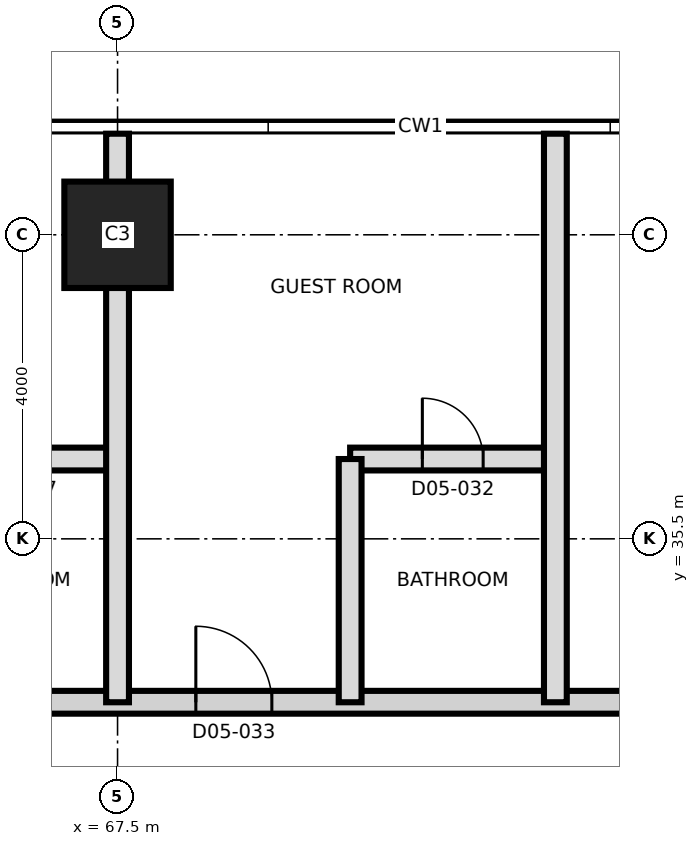
"""IFC4 building model, lengths in metres.
Left out: names, types, materials, properties, quantities, classifications, styles, units other than length and angle.
Written with IfcOpenShell. Run it as: python <this file> out.ifc"""

import sys

from ifc_helpers import new_model, si_unit, direction, frame, frame_2d, origin, origin_2d, place, context, subcontext, project, spatial, rectangle, extrude, element, fill, save


model = new_model("IFC4")
c1 = context("Model", 3, precision=1e-05, world=origin(), true_north=direction((0.0, 1.0)))
c2 = subcontext(c1, "Body", "Model", "MODEL_VIEW")
j1 = project(units=[si_unit("LENGTHUNIT", "METRE"), si_unit("PLANEANGLEUNIT", "RADIAN")], contexts=[c1])
p1 = place(None, origin())
s1 = spatial("IfcSite", under=j1, at=p1, CompositionType="ELEMENT")
p2 = place(p1, origin())
s2 = spatial("IfcBuilding", under=s1, at=p2, CompositionType="ELEMENT")
p3 = place(p2, frame((0.0, 0.0, 77.9)))
s3 = spatial("IfcBuildingStorey", under=s2, at=p3, CompositionType="ELEMENT", Elevation=77.9)
p4 = place(p3, frame((67.5, 39.5, 0.0), z_axis=(0.0, 0.0, 1.0), x_axis=(1.0, 0.0, 0.0)))
e1 = element("IfcColumn", 1, at=p4, inside=s3, PredefinedType="COLUMN", context=c2, shape_type="SweptSolid", body=[
    extrude(rectangle(XDim=1.4, YDim=1.4, at=origin_2d()), origin(), (0.0, 0.0, 1.0), 3.7),
])
p5 = place(p3, frame((58.95, 33.35, 0.0), z_axis=(0.0, 0.0, 1.0), x_axis=(1.0, 0.0, 0.0)))
e2 = element("IfcWall", 2, at=p5, inside=s3, PredefinedType="PARTITIONING", context=c2, shape_type="SweptSolid", body=[
    extrude(rectangle(XDim=26.38, YDim=0.3, at=frame_2d((13.19, 0.0))), origin(), (0.0, 0.0, 1.0), 3.4),
])
p6 = place(p5, frame((0.685, 0.0, 0.0)))
e3 = element("IfcOpeningElement", 3, at=p6, cuts=e2, PredefinedType="OPENING", context=c2, shape_type="SweptSolid", body=[
    extrude(rectangle(XDim=1.2, YDim=2.1, at=frame_2d((0.6, 1.05))), frame((0.0, 0.16, 0.0), z_axis=(0.0, -1.0, 0.0), x_axis=(1.0, 0.0, 0.0)), (0.0, 0.0, 1.0), 0.32),
])
p7 = place(p5, frame((3.935, 0.0, 0.0)))
e4 = element("IfcOpeningElement", 4, at=p7, cuts=e2, PredefinedType="OPENING", context=c2, shape_type="SweptSolid", body=[
    extrude(rectangle(XDim=1.0, YDim=2.1, at=frame_2d((0.5, 1.05))), frame((0.0, 0.16, 0.0), z_axis=(0.0, -1.0, 0.0), x_axis=(1.0, 0.0, 0.0)), (0.0, 0.0, 1.0), 0.32),
])
p8 = place(p5, frame((9.58, 0.0, 0.0)))
e5 = element("IfcOpeningElement", 5, at=p8, cuts=e2, PredefinedType="OPENING", context=c2, shape_type="SweptSolid", body=[
    extrude(rectangle(XDim=1.0, YDim=2.1, at=frame_2d((0.5, 1.05))), frame((0.0, 0.16, 0.0), z_axis=(0.0, -1.0, 0.0), x_axis=(1.0, 0.0, 0.0)), (0.0, 0.0, 1.0), 0.32),
])
p9 = place(p5, frame((15.43, 0.0, 0.0)))
e6 = element("IfcOpeningElement", 6, at=p9, cuts=e2, PredefinedType="OPENING", context=c2, shape_type="SweptSolid", body=[
    extrude(rectangle(XDim=1.0, YDim=2.1, at=frame_2d((0.5, 1.05))), frame((0.0, 0.16, 0.0), z_axis=(0.0, -1.0, 0.0), x_axis=(1.0, 0.0, 0.0)), (0.0, 0.0, 1.0), 0.32),
])
p10 = place(p5, frame((21.55, 0.0, 0.0)))
e7 = element("IfcOpeningElement", 7, at=p10, cuts=e2, PredefinedType="OPENING", context=c2, shape_type="SweptSolid", body=[
    extrude(rectangle(XDim=1.0, YDim=2.4, at=frame_2d((0.5, 1.2))), frame((0.0, 0.16, 0.0), z_axis=(0.0, -1.0, 0.0), x_axis=(1.0, 0.0, 0.0)), (0.0, 0.0, 1.0), 0.32),
])
p11 = place(p3, frame((64.8, 36.55, 0.0), z_axis=(0.0, 0.0, 1.0), x_axis=(1.0, 0.0, 0.0)))
e8 = element("IfcWall", 8, at=p11, inside=s3, PredefinedType="PARTITIONING", context=c2, shape_type="SweptSolid", body=[
    extrude(rectangle(XDim=2.7, YDim=0.3, at=frame_2d((1.35, 0.0))), origin(), (0.0, 0.0, 1.0), 3.4),
])
p12 = place(p11, frame((0.95, 0.0, 0.0)))
e9 = element("IfcOpeningElement", 9, at=p12, cuts=e8, PredefinedType="OPENING", context=c2, shape_type="SweptSolid", body=[
    extrude(rectangle(XDim=0.8, YDim=2.1, at=frame_2d((0.4, 1.05))), frame((0.0, 0.16, 0.0), z_axis=(0.0, -1.0, 0.0), x_axis=(1.0, 0.0, 0.0)), (0.0, 0.0, 1.0), 0.32),
])
p13 = place(p3, frame((70.56, 36.55, 0.0), z_axis=(0.0, 0.0, 1.0), x_axis=(1.0, 0.0, 0.0)))
e10 = element("IfcWall", 10, at=p13, inside=s3, PredefinedType="PARTITIONING", context=c2, shape_type="SweptSolid", body=[
    extrude(rectangle(XDim=2.7, YDim=0.3, at=frame_2d((1.35, 0.0))), origin(), (0.0, 0.0, 1.0), 3.4),
])
p14 = place(p13, frame((0.95, 0.0, 0.0)))
e11 = element("IfcOpeningElement", 11, at=p14, cuts=e10, PredefinedType="OPENING", context=c2, shape_type="SweptSolid", body=[
    extrude(rectangle(XDim=0.8, YDim=2.1, at=frame_2d((0.4, 1.05))), frame((0.0, 0.16, 0.0), z_axis=(0.0, -1.0, 0.0), x_axis=(1.0, 0.0, 0.0)), (0.0, 0.0, 1.0), 0.32),
])
p15 = place(p3, frame((67.5, 33.35, 0.0), z_axis=(0.0, 0.0, 1.0), x_axis=(0.0, 1.0, 0.0)))
e12 = element("IfcWall", 12, at=p15, inside=s3, PredefinedType="PARTITIONING", context=c2, shape_type="SweptSolid", body=[
    extrude(rectangle(XDim=7.48, YDim=0.3, at=frame_2d((3.74, 0.0))), origin(), (0.0, 0.0, 1.0), 3.4),
])
p16 = place(p3, frame((70.56, 33.35, 0.0), z_axis=(0.0, 0.0, 1.0), x_axis=(0.0, 1.0, 0.0)))
e13 = element("IfcWall", 13, at=p16, inside=s3, PredefinedType="PARTITIONING", context=c2, shape_type="SweptSolid", body=[
    extrude(rectangle(XDim=3.2, YDim=0.3, at=frame_2d((1.6, 0.0))), origin(), (0.0, 0.0, 1.0), 3.4),
])
p17 = place(p3, frame((73.26, 33.35, 0.0), z_axis=(0.0, 0.0, 1.0), x_axis=(0.0, 1.0, 0.0)))
e14 = element("IfcWall", 14, at=p17, inside=s3, PredefinedType="PARTITIONING", context=c2, shape_type="SweptSolid", body=[
    extrude(rectangle(XDim=7.48, YDim=0.3, at=frame_2d((3.74, 0.0))), origin(), (0.0, 0.0, 1.0), 3.4),
])
p18 = place(p14, origin())
e15 = element("IfcDoor", 15, at=p18, inside=s3, OperationType="SINGLE_SWING_LEFT", PredefinedType="DOOR", context=c2, shape_type="SweptSolid", body=[
    extrude(rectangle(XDim=0.8, YDim=2.1, at=frame_2d((0.4, 1.05))), frame((0.0, 0.025, 0.0), z_axis=(0.0, -1.0, 0.0), x_axis=(1.0, 0.0, 0.0)), (0.0, 0.0, 1.0), 0.05),
])
fill(e11, e15)
p19 = place(p8, origin())
e16 = element("IfcDoor", 16, at=p19, inside=s3, OperationType="SINGLE_SWING_LEFT", PredefinedType="DOOR", context=c2, shape_type="SweptSolid", body=[
    extrude(rectangle(XDim=1.0, YDim=2.1, at=frame_2d((0.5, 1.05))), frame((0.0, 0.025, 0.0), z_axis=(0.0, -1.0, 0.0), x_axis=(1.0, 0.0, 0.0)), (0.0, 0.0, 1.0), 0.05),
])
fill(e5, e16)
save(model, sys.argv[1])
